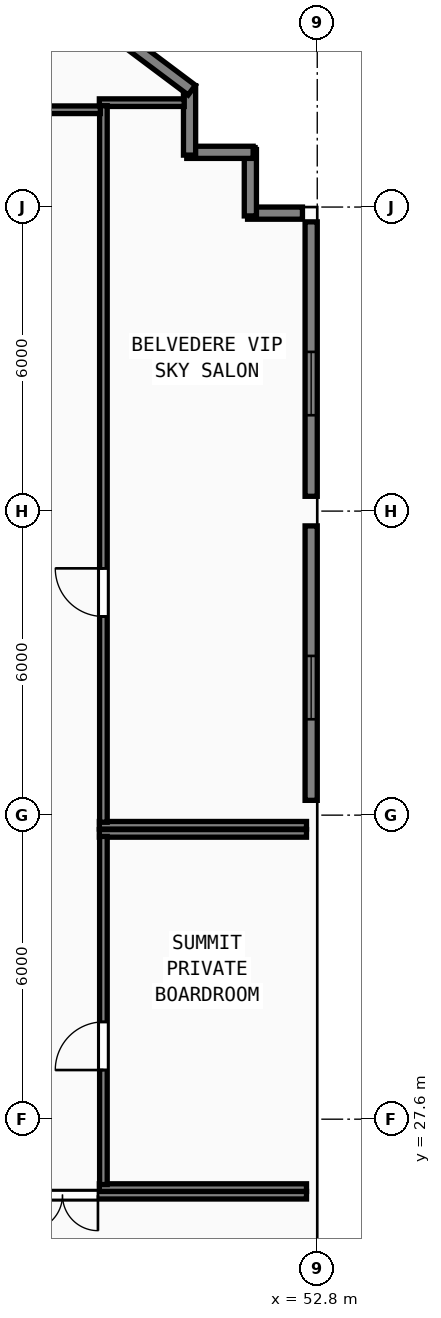
"""IFC4 building model, lengths in metres.
Left out: names, types, materials, properties, quantities, classifications, styles, units other than length and angle.
Written with IfcOpenShell. Run it as: python <this file> out.ifc"""

import sys

from ifc_helpers import new_model, si_unit, direction, frame, frame_2d, origin, origin_2d, place, context, subcontext, project, spatial, rectangle, hollow_rectangle, extrude, element, fill, save


model = new_model("IFC4")
c1 = context("Model", 3, precision=1e-05, world=origin(), true_north=direction((0.0, 1.0)))
c2 = subcontext(c1, "Body", "Model", "MODEL_VIEW")
j1 = project(units=[si_unit("LENGTHUNIT", "METRE"), si_unit("PLANEANGLEUNIT", "RADIAN")], contexts=[c1])
p1 = place(None, origin())
s1 = spatial("IfcSite", under=j1, at=p1, CompositionType="ELEMENT")
p2 = place(p1, origin())
s2 = spatial("IfcBuilding", under=s1, at=p2, CompositionType="ELEMENT")
p3 = place(p2, frame((0.0, 0.0, 323.2)))
s3 = spatial("IfcBuildingStorey", under=s2, at=p3, CompositionType="ELEMENT", Elevation=323.2)
for number, where, z_axis, x_axis in (
    (1, (52.8, 33.6, 0.0), (0.0, 0.0, 1.0), (1.0, 0.0, 0.0)),
    (2, (52.8, 45.6, 0.0), (0.0, 0.0, 1.0), (1.0, 0.0, 0.0)),
    (3, (52.8, 27.6, 0.0), (0.0, 0.0, 1.0), (1.0, 0.0, 0.0)),
    (4, (52.8, 39.6, 0.0), (0.0, 0.0, 1.0), (1.0, 0.0, 0.0)),
):
    element("IfcColumn", number, at=place(p3, frame(where, z_axis=z_axis, x_axis=x_axis)), inside=s3, PredefinedType="COLUMN", context=c2, shape_type="SweptSolid", body=[
        extrude(hollow_rectangle(XDim=0.6, YDim=0.6, WallThickness=0.024, at=origin_2d()), origin(), (0.0, 0.0, 1.0), 5.0),
    ])
p4 = place(p3, frame((52.68, 33.892, 0.0), z_axis=(0.0, 0.0, 1.0), x_axis=(0.0, 1.0, 0.0)))
e5 = element("IfcWall", 5, at=p4, inside=s3, PredefinedType="SOLIDWALL", context=c2, shape_type="SweptSolid", body=[
    extrude(rectangle(XDim=5.416, YDim=0.24, at=frame_2d((2.708, 0.0))), origin(), (0.0, 0.0, 1.0), 4.75),
])
p5 = place(p4, frame((1.6, 0.0, 0.85)))
e6 = element("IfcOpeningElement", 6, at=p5, cuts=e5, PredefinedType="OPENING", context=c2, shape_type="SweptSolid", body=[
    extrude(rectangle(XDim=1.25, YDim=1.95, at=frame_2d((0.625, 0.975))), frame((0.0, 0.13, 0.0), z_axis=(0.0, -1.0, 0.0), x_axis=(1.0, 0.0, 0.0)), (0.0, 0.0, 1.0), 0.26),
])
p6 = place(p3, frame((52.68, 39.892, 0.0), z_axis=(0.0, 0.0, 1.0), x_axis=(0.0, 1.0, 0.0)))
e7 = element("IfcWall", 7, at=p6, inside=s3, PredefinedType="SOLIDWALL", context=c2, shape_type="SweptSolid", body=[
    extrude(rectangle(XDim=5.416, YDim=0.24, at=frame_2d((2.708, 0.0))), origin(), (0.0, 0.0, 1.0), 4.75),
])
p7 = place(p6, frame((1.6, 0.0, 0.85)))
e8 = element("IfcOpeningElement", 8, at=p7, cuts=e7, PredefinedType="OPENING", context=c2, shape_type="SweptSolid", body=[
    extrude(rectangle(XDim=1.25, YDim=1.95, at=frame_2d((0.625, 0.975))), frame((0.0, 0.13, 0.0), z_axis=(0.0, -1.0, 0.0), x_axis=(1.0, 0.0, 0.0)), (0.0, 0.0, 1.0), 0.26),
])
p8 = place(p3, frame((52.508, 45.48, 0.0), z_axis=(0.0, 0.0, 1.0), x_axis=(-1.0, 0.0, 0.0)))
e9 = element("IfcWall", 9, at=p8, inside=s3, PredefinedType="SOLIDWALL", context=c2, shape_type="SweptSolid", body=[
    extrude(rectangle(XDim=1.083, YDim=0.24, at=frame_2d((0.542, 0.0))), origin(), (0.0, 0.0, 1.0), 4.75),
])
p9 = place(p3, frame((51.48, 45.425, 0.0), z_axis=(0.0, 0.0, 1.0), x_axis=(0.0, 1.0, 0.0)))
e10 = element("IfcWall", 10, at=p9, inside=s3, PredefinedType="SOLIDWALL", context=c2, shape_type="SweptSolid", body=[
    extrude(rectangle(XDim=1.31, YDim=0.24, at=frame_2d((0.655, 0.0))), origin(), (0.0, 0.0, 1.0), 4.75),
])
p10 = place(p3, frame((51.535, 46.68, 0.0), z_axis=(0.0, 0.0, 1.0), x_axis=(-1.0, 0.0, 0.0)))
e11 = element("IfcWall", 11, at=p10, inside=s3, PredefinedType="SOLIDWALL", context=c2, shape_type="SweptSolid", body=[
    extrude(rectangle(XDim=1.31, YDim=0.24, at=frame_2d((0.655, 0.0))), origin(), (0.0, 0.0, 1.0), 4.75),
])
p11 = place(p3, frame((50.28, 46.625, 0.0), z_axis=(0.0, 0.0, 1.0), x_axis=(0.0, 1.0, 0.0)))
e12 = element("IfcWall", 12, at=p11, inside=s3, PredefinedType="SOLIDWALL", context=c2, shape_type="SweptSolid", body=[
    extrude(rectangle(XDim=1.37, YDim=0.24, at=frame_2d((0.685, 0.0))), origin(), (0.0, 0.0, 1.0), 4.75),
])
p12 = place(p3, frame((50.324, 47.907, 0.0), z_axis=(0.0, 0.0, 1.0), x_axis=(-0.80001459783, 0.599980535734, 0.0)))
e13 = element("IfcWall", 13, at=p12, inside=s3, PredefinedType="SOLIDWALL", context=c2, shape_type="SweptSolid", body=[
    extrude(rectangle(XDim=6.021, YDim=0.24, at=frame_2d((3.01, 0.0))), origin(), (0.0, 0.0, 1.0), 4.75),
])
p13 = place(p12, frame((1.6, 0.0, 0.85)))
e14 = element("IfcOpeningElement", 14, at=p13, cuts=e13, PredefinedType="OPENING", context=c2, shape_type="SweptSolid", body=[
    extrude(rectangle(XDim=1.25, YDim=1.95, at=frame_2d((0.625, 0.975))), frame((0.0, 0.13, 0.0), z_axis=(0.0, -1.0, 0.0), x_axis=(1.0, 0.0, 0.0)), (0.0, 0.0, 1.0), 0.26),
])
p14 = place(p3, frame((38.282, 26.1, 0.0), z_axis=(0.0, 0.0, 1.0), x_axis=(1.0, 0.0, 0.0)))
e15 = element("IfcWall", 15, at=p14, inside=s3, PredefinedType="PARTITIONING", context=c2, shape_type="SweptSolid", body=[
    extrude(rectangle(XDim=14.306, YDim=0.15, at=frame_2d((7.153, 0.0))), origin(), (0.0, 0.0, 1.0), 4.75),
])
p15 = place(p14, frame((10.19, 0.0, 0.0), z_axis=(0.0, 0.0, 1.0), x_axis=(-1.0, 0.0, 0.0)))
e16 = element("IfcOpeningElement", 16, at=p15, cuts=e15, PredefinedType="OPENING", context=c2, shape_type="SweptSolid", body=[
    extrude(rectangle(XDim=1.4, YDim=2.18, at=frame_2d((0.7, 1.09))), frame((0.0, 0.085, 0.0), z_axis=(0.0, -1.0, 0.0), x_axis=(1.0, 0.0, 0.0)), (0.0, 0.0, 1.0), 0.17),
])
p16 = place(p3, frame((48.5, 47.66, 0.0), z_axis=(0.0, 0.0, 1.0), x_axis=(1.0, 0.0, 0.0)))
e17 = element("IfcWall", 17, at=p16, inside=s3, PredefinedType="PARTITIONING", context=c2, shape_type="SweptSolid", body=[
    extrude(rectangle(XDim=1.675, YDim=0.15, at=frame_2d((0.837, 0.0))), origin(), (0.0, 0.0, 1.0), 4.75),
])
p17 = place(p3, frame((48.5, 33.4, 0.0), z_axis=(0.0, 0.0, 1.0), x_axis=(1.0, 0.0, 0.0)))
e18 = element("IfcWall", 18, at=p17, inside=s3, PredefinedType="PARTITIONING", context=c2, shape_type="SweptSolid", body=[
    extrude(rectangle(XDim=4.088, YDim=0.15, at=frame_2d((2.044, 0.0))), origin(), (0.0, 0.0, 1.0), 4.035),
])
p18 = place(p3, frame((48.58, 33.46, 0.0), z_axis=(0.0, 0.0, 1.0), x_axis=(0.0, 1.0, 0.0)))
e19 = element("IfcWall", 19, at=p18, inside=s3, PredefinedType="PARTITIONING", context=c2, shape_type="SweptSolid", body=[
    extrude(rectangle(XDim=14.14, YDim=0.15, at=frame_2d((7.07, 0.0))), origin(), (0.0, 0.0, 1.0), 4.75),
])
p19 = place(p18, frame((4.06, 0.0, 0.0)))
e20 = element("IfcOpeningElement", 20, at=p19, cuts=e19, PredefinedType="OPENING", context=c2, shape_type="SweptSolid", body=[
    extrude(rectangle(XDim=0.95, YDim=2.12, at=frame_2d((0.475, 1.06))), frame((0.0, 0.085, 0.0), z_axis=(0.0, -1.0, 0.0), x_axis=(1.0, 0.0, 0.0)), (0.0, 0.0, 1.0), 0.17),
])
for number, where, z_axis, x_axis in (
    (21, (48.5, 33.24, 0.0), (0.0, 0.0, 1.0), (1.0, 0.0, 0.0)),
    (22, (48.5, 26.25, 0.0), (0.0, 0.0, 1.0), (1.0, 0.0, 0.0)),
):
    element("IfcWall", number, at=place(p3, frame(where, z_axis=z_axis, x_axis=x_axis)), inside=s3, PredefinedType="PARTITIONING", context=c2, shape_type="SweptSolid", body=[
        extrude(rectangle(XDim=4.088, YDim=0.15, at=frame_2d((2.044, 0.0))), origin(), (0.0, 0.0, 1.0), 4.75),
    ])
p20 = place(p3, frame((48.58, 26.31, 0.0), z_axis=(0.0, 0.0, 1.0), x_axis=(0.0, 1.0, 0.0)))
e23 = element("IfcWall", 23, at=p20, inside=s3, PredefinedType="PARTITIONING", context=c2, shape_type="SweptSolid", body=[
    extrude(rectangle(XDim=6.87, YDim=0.15, at=frame_2d((3.435, 0.0))), origin(), (0.0, 0.0, 1.0), 4.75),
])
p21 = place(p20, frame((2.26, 0.0, 0.0)))
e24 = element("IfcOpeningElement", 24, at=p21, cuts=e23, PredefinedType="OPENING", context=c2, shape_type="SweptSolid", body=[
    extrude(rectangle(XDim=0.95, YDim=2.12, at=frame_2d((0.475, 1.06))), frame((0.0, 0.085, 0.0), z_axis=(0.0, -1.0, 0.0), x_axis=(1.0, 0.0, 0.0)), (0.0, 0.0, 1.0), 0.17),
])
p22 = place(p3, frame((43.432, 47.52, 0.0), z_axis=(0.0, 0.0, 1.0), x_axis=(1.0, 0.0, 0.0)))
e25 = element("IfcWall", 25, at=p22, inside=s3, PredefinedType="PARTITIONING", context=c2, shape_type="SweptSolid", body=[
    extrude(rectangle(XDim=5.088, YDim=0.15, at=frame_2d((2.544, 0.0))), origin(), (0.0, 0.0, 1.0), 4.75),
])
p23 = place(p22, frame((0.748, 0.0, 0.0)))
e26 = element("IfcOpeningElement", 26, at=p23, cuts=e25, PredefinedType="OPENING", context=c2, shape_type="SweptSolid", body=[
    extrude(rectangle(XDim=0.95, YDim=2.12, at=frame_2d((0.475, 1.06))), frame((0.0, 0.085, 0.0), z_axis=(0.0, -1.0, 0.0), x_axis=(1.0, 0.0, 0.0)), (0.0, 0.0, 1.0), 0.17),
])
p24 = place(p5, origin())
e27 = element("IfcWindow", 27, at=p24, inside=s3, PartitioningType="SINGLE_PANEL", PredefinedType="WINDOW", context=c2, shape_type="SweptSolid", body=[
    extrude(rectangle(XDim=1.25, YDim=1.95, at=frame_2d((0.625, 0.975))), frame((0.0, 0.03, 0.0), z_axis=(0.0, -1.0, 0.0), x_axis=(1.0, 0.0, 0.0)), (0.0, 0.0, 1.0), 0.06),
])
fill(e6, e27)
p25 = place(p7, origin())
e28 = element("IfcWindow", 28, at=p25, inside=s3, PartitioningType="SINGLE_PANEL", PredefinedType="WINDOW", context=c2, shape_type="SweptSolid", body=[
    extrude(rectangle(XDim=1.25, YDim=1.95, at=frame_2d((0.625, 0.975))), frame((0.0, 0.03, 0.0), z_axis=(0.0, -1.0, 0.0), x_axis=(1.0, 0.0, 0.0)), (0.0, 0.0, 1.0), 0.06),
])
fill(e8, e28)
p26 = place(p15, origin())
e29 = element("IfcDoor", 29, at=p26, inside=s3, OperationType="DOUBLE_DOOR_SINGLE_SWING", PredefinedType="DOOR", context=c2, shape_type="SweptSolid", body=[
    extrude(rectangle(XDim=1.4, YDim=2.18, at=frame_2d((0.7, 1.09))), frame((0.0, 0.025, 0.0), z_axis=(0.0, -1.0, 0.0), x_axis=(1.0, 0.0, 0.0)), (0.0, 0.0, 1.0), 0.05),
])
fill(e16, e29)
p27 = place(p19, origin())
e30 = element("IfcDoor", 30, at=p27, inside=s3, OperationType="SINGLE_SWING_RIGHT", PredefinedType="DOOR", context=c2, shape_type="SweptSolid", body=[
    extrude(rectangle(XDim=0.95, YDim=2.12, at=frame_2d((0.475, 1.06))), frame((0.0, 0.025, 0.0), z_axis=(0.0, -1.0, 0.0), x_axis=(1.0, 0.0, 0.0)), (0.0, 0.0, 1.0), 0.05),
])
fill(e20, e30)
p28 = place(p21, origin())
e31 = element("IfcDoor", 31, at=p28, inside=s3, OperationType="SINGLE_SWING_LEFT", PredefinedType="DOOR", context=c2, shape_type="SweptSolid", body=[
    extrude(rectangle(XDim=0.95, YDim=2.12, at=frame_2d((0.475, 1.06))), frame((0.0, 0.025, 0.0), z_axis=(0.0, -1.0, 0.0), x_axis=(1.0, 0.0, 0.0)), (0.0, 0.0, 1.0), 0.05),
])
fill(e24, e31)
save(model, sys.argv[1])
